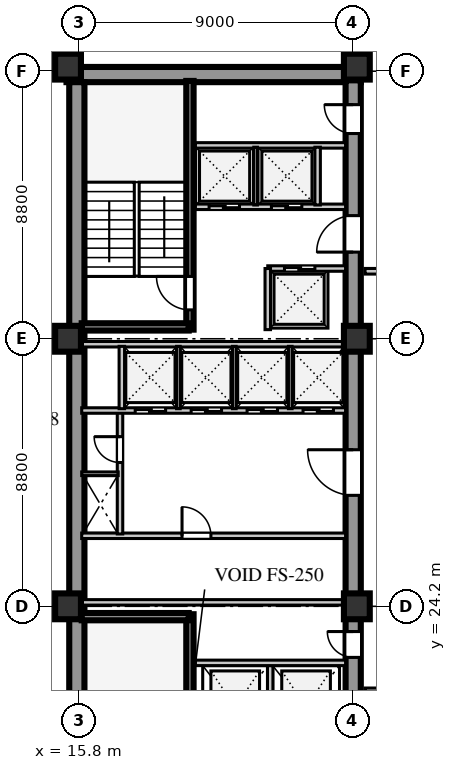
"""IFC4 building model, lengths in metres.
Left out: names, types, materials, properties, quantities, classifications, styles, units other than length and angle.
Written with IfcOpenShell. Run it as: python <this file> out.ifc"""

import sys

from ifc_helpers import new_model, si_unit, direction, frame, frame_2d, origin, origin_2d, place, context, subcontext, project, spatial, rectangle, extrude, element, fill, save


model = new_model("IFC4")
c1 = context("Model", 3, precision=1e-05, world=origin(), true_north=direction((0.0, 1.0)))
c2 = subcontext(c1, "Body", "Model", "MODEL_VIEW")
j1 = project(units=[si_unit("LENGTHUNIT", "METRE"), si_unit("PLANEANGLEUNIT", "RADIAN")], contexts=[c1])
p1 = place(None, origin())
s1 = spatial("IfcSite", under=j1, at=p1, CompositionType="ELEMENT")
p2 = place(p1, origin())
s2 = spatial("IfcBuilding", under=s1, at=p2, CompositionType="ELEMENT")
p3 = place(p2, frame((0.0, 0.0, 150.2)))
s3 = spatial("IfcBuildingStorey", under=s2, at=p3, CompositionType="ELEMENT", Elevation=150.2)
p4 = place(p3, frame((15.4, 41.69, 0.0), z_axis=(0.0, 0.0, 1.0), x_axis=(1.0, 0.0, 0.0)))
e1 = element("IfcWall", 1, at=p4, inside=s3, PredefinedType="SHEAR", context=c2, shape_type="SweptSolid", body=[
    extrude(rectangle(XDim=9.68, YDim=0.5, at=frame_2d((4.84, 0.0))), origin(), (0.0, 0.0, 1.0), 3.55),
])
p5 = place(p3, frame((15.74, 15.81, 0.0), z_axis=(0.0, 0.0, 1.0), x_axis=(0.0, 1.0, 0.0)))
e2 = element("IfcWall", 2, at=p5, inside=s3, PredefinedType="SHEAR", context=c2, shape_type="SweptSolid", body=[
    extrude(rectangle(XDim=25.63, YDim=0.5, at=frame_2d((12.815, 0.0))), origin(), (0.0, 0.0, 1.0), 3.55),
])
p6 = place(p3, frame((24.83, 15.74, 0.0), z_axis=(0.0, 0.0, 1.0), x_axis=(0.0, 1.0, 0.0)))
e3 = element("IfcWall", 3, at=p6, inside=s3, PredefinedType="SHEAR", context=c2, shape_type="SweptSolid", body=[
    extrude(rectangle(XDim=25.76, YDim=0.5, at=frame_2d((12.88, 0.0))), origin(), (0.0, 0.0, 1.0), 3.55),
])
p7 = place(p6, frame((1.61, 0.0, 0.0)))
e4 = element("IfcOpeningElement", 4, at=p7, cuts=e3, PredefinedType="OPENING", context=c2, shape_type="SweptSolid", body=[
    extrude(rectangle(XDim=1.2, YDim=2.1, at=frame_2d((0.6, 1.05))), frame((0.0, 0.26, 0.0), z_axis=(0.0, -1.0, 0.0), x_axis=(1.0, 0.0, 0.0)), (0.0, 0.0, 1.0), 0.52),
])
p8 = place(p6, frame((6.78, 0.0, 0.0)))
e5 = element("IfcOpeningElement", 5, at=p8, cuts=e3, PredefinedType="OPENING", context=c2, shape_type="SweptSolid", body=[
    extrude(rectangle(XDim=0.85, YDim=2.06, at=frame_2d((0.425, 1.03))), frame((0.0, 0.26, 0.0), z_axis=(0.0, -1.0, 0.0), x_axis=(1.0, 0.0, 0.0)), (0.0, 0.0, 1.0), 0.52),
])
p9 = place(p6, frame((12.11, 0.0, 0.0)))
e6 = element("IfcOpeningElement", 6, at=p9, cuts=e3, PredefinedType="OPENING", context=c2, shape_type="SweptSolid", body=[
    extrude(rectangle(XDim=1.5, YDim=2.12, at=frame_2d((0.75, 1.06))), frame((0.0, 0.26, 0.0), z_axis=(0.0, -1.0, 0.0), x_axis=(1.0, 0.0, 0.0)), (0.0, 0.0, 1.0), 0.52),
])
p10 = place(p6, frame((20.11, 0.0, 0.0)))
e7 = element("IfcOpeningElement", 7, at=p10, cuts=e3, PredefinedType="OPENING", context=c2, shape_type="SweptSolid", body=[
    extrude(rectangle(XDim=1.2, YDim=2.12, at=frame_2d((0.6, 1.06))), frame((0.0, 0.26, 0.0), z_axis=(0.0, -1.0, 0.0), x_axis=(1.0, 0.0, 0.0)), (0.0, 0.0, 1.0), 0.52),
])
p11 = place(p6, frame((24.01, 0.0, 0.0)))
e8 = element("IfcOpeningElement", 8, at=p11, cuts=e3, PredefinedType="OPENING", context=c2, shape_type="SweptSolid", body=[
    extrude(rectangle(XDim=0.95, YDim=2.1, at=frame_2d((0.475, 1.05))), frame((0.0, 0.26, 0.0), z_axis=(0.0, -1.0, 0.0), x_axis=(1.0, 0.0, 0.0)), (0.0, 0.0, 1.0), 0.52),
])
for number, where, z_axis, x_axis in (
    (9, (15.45, 24.2, 0.0), (0.0, 0.0, 1.0), (1.0, 0.0, 0.0)),
    (10, (15.45, 33.0, 0.0), (0.0, 0.0, 1.0), (1.0, 0.0, 0.0)),
    (11, (15.45, 41.95, 0.0), (0.0, 0.0, 1.0), (1.0, 0.0, 0.0)),
    (12, (24.95, 24.2, 0.0), (0.0, 0.0, 1.0), (1.0, 0.0, 0.0)),
    (13, (24.95, 33.0, 0.0), (0.0, 0.0, 1.0), (1.0, 0.0, 0.0)),
    (14, (24.95, 41.95, 0.0), (0.0, 0.0, 1.0), (1.0, 0.0, 0.0)),
):
    element("IfcColumn", number, at=place(p3, frame(where, z_axis=z_axis, x_axis=x_axis)), inside=s3, PredefinedType="COLUMN", context=c2, shape_type="SweptSolid", body=[
        extrude(rectangle(XDim=0.85, YDim=0.85, at=origin_2d()), origin(), (0.0, 0.0, 1.0), 3.55),
    ])
p12 = place(p3, frame((19.46, 15.74, 0.0), z_axis=(0.0, 0.0, 1.0), x_axis=(0.0, 1.0, 0.0)))
e15 = element("IfcWall", 15, at=p12, inside=s3, PredefinedType="SHEAR", context=c2, shape_type="SweptSolid", body=[
    extrude(rectangle(XDim=8.2, YDim=0.24, at=frame_2d((4.1, 0.0))), origin(), (0.0, 0.0, 1.0), 3.85),
])
p13 = place(p12, frame((0.45, 0.0, 0.0)))
e16 = element("IfcOpeningElement", 16, at=p13, cuts=e15, PredefinedType="OPENING", context=c2, shape_type="SweptSolid", body=[
    extrude(rectangle(XDim=1.1, YDim=2.1, at=frame_2d((0.55, 1.05))), frame((0.0, 0.13, 0.0), z_axis=(0.0, -1.0, 0.0), x_axis=(1.0, 0.0, 0.0)), (0.0, 0.0, 1.0), 0.26),
])
p14 = place(p3, frame((15.9, 23.86, 0.0), z_axis=(0.0, 0.0, 1.0), x_axis=(1.0, 0.0, 0.0)))
e17 = element("IfcWall", 17, at=p14, inside=s3, PredefinedType="SHEAR", context=c2, shape_type="SweptSolid", body=[
    extrude(rectangle(XDim=3.52, YDim=0.24, at=frame_2d((1.76, 0.0))), origin(), (0.0, 0.0, 1.0), 3.85),
])
p15 = place(p3, frame((22.1, 19.51, 0.0), z_axis=(0.0, 0.0, 1.0), x_axis=(0.0, 1.0, 0.0)))
e18 = element("IfcWall", 18, at=p15, inside=s3, PredefinedType="SOLIDWALL", context=c2, shape_type="SweptSolid", body=[
    extrude(rectangle(XDim=2.74, YDim=0.18, at=frame_2d((1.37, 0.0))), origin(), (0.0, 0.0, 1.0), 3.55),
])
p16 = place(p3, frame((19.64, 22.34, 0.0), z_axis=(0.0, 0.0, 1.0), x_axis=(1.0, 0.0, 0.0)))
e19 = element("IfcWall", 19, at=p16, inside=s3, PredefinedType="SOLIDWALL", context=c2, shape_type="SweptSolid", body=[
    extrude(rectangle(XDim=4.94, YDim=0.18, at=frame_2d((2.47, 0.0))), origin(), (0.0, 0.0, 1.0), 3.55),
])
p17 = place(p3, frame((15.9, 26.52, 0.0), z_axis=(0.0, 0.0, 1.0), x_axis=(1.0, 0.0, 0.0)))
e20 = element("IfcWall", 20, at=p17, inside=s3, PredefinedType="SOLIDWALL", context=c2, shape_type="SweptSolid", body=[
    extrude(rectangle(XDim=8.68, YDim=0.18, at=frame_2d((4.34, 0.0))), origin(), (0.0, 0.0, 1.0), 3.55),
])
p18 = place(p17, frame((3.3, 0.0, 0.0)))
e21 = element("IfcOpeningElement", 21, at=p18, cuts=e20, PredefinedType="OPENING", context=c2, shape_type="SweptSolid", body=[
    extrude(rectangle(XDim=0.95, YDim=2.1, at=frame_2d((0.475, 1.05))), frame((0.0, 0.1, 0.0), z_axis=(0.0, -1.0, 0.0), x_axis=(1.0, 0.0, 0.0)), (0.0, 0.0, 1.0), 0.2),
])
p19 = place(p3, frame((15.9, 24.33, 0.0), z_axis=(0.0, 0.0, 1.0), x_axis=(1.0, 0.0, 0.0)))
e22 = element("IfcWall", 22, at=p19, inside=s3, PredefinedType="SOLIDWALL", context=c2, shape_type="SweptSolid", body=[
    extrude(rectangle(XDim=8.68, YDim=0.18, at=frame_2d((4.34, 0.0))), origin(), (0.0, 0.0, 1.0), 2.9),
])
p20 = place(p3, frame((17.16, 26.58, 0.0), z_axis=(0.0, 0.0, 1.0), x_axis=(0.0, 1.0, 0.0)))
e23 = element("IfcWall", 23, at=p20, inside=s3, PredefinedType="SOLIDWALL", context=c2, shape_type="SweptSolid", body=[
    extrude(rectangle(XDim=4.02, YDim=0.18, at=frame_2d((2.01, 0.0))), origin(), (0.0, 0.0, 1.0), 3.55),
])
p21 = place(p20, frame((2.35, 0.0, 0.0)))
e24 = element("IfcOpeningElement", 24, at=p21, cuts=e23, PredefinedType="OPENING", context=c2, shape_type="SweptSolid", body=[
    extrude(rectangle(XDim=0.85, YDim=2.06, at=frame_2d((0.425, 1.03))), frame((0.0, 0.1, 0.0), z_axis=(0.0, -1.0, 0.0), x_axis=(1.0, 0.0, 0.0)), (0.0, 0.0, 1.0), 0.2),
])
p22 = place(p3, frame((15.9, 28.56, 0.0), z_axis=(0.0, 0.0, 1.0), x_axis=(1.0, 0.0, 0.0)))
e25 = element("IfcWall", 25, at=p22, inside=s3, PredefinedType="PARTITIONING", context=c2, shape_type="SweptSolid", body=[
    extrude(rectangle(XDim=1.2, YDim=0.12, at=frame_2d((0.6, 0.0))), origin(), (0.0, 0.0, 1.0), 3.55),
])
p23 = place(p3, frame((15.9, 30.64, 0.0), z_axis=(0.0, 0.0, 1.0), x_axis=(1.0, 0.0, 0.0)))
e26 = element("IfcWall", 26, at=p23, inside=s3, PredefinedType="SOLIDWALL", context=c2, shape_type="SweptSolid", body=[
    extrude(rectangle(XDim=8.68, YDim=0.18, at=frame_2d((4.34, 0.0))), origin(), (0.0, 0.0, 1.0), 3.55),
])
p24 = place(p23, frame((1.76, 0.0, 0.0)))
e27 = element("IfcOpeningElement", 27, at=p24, cuts=e26, PredefinedType="OPENING", context=c2, shape_type="SweptSolid", body=[
    extrude(rectangle(XDim=1.0, YDim=2.1, at=frame_2d((0.5, 1.05))), frame((0.0, 0.1, 0.0), z_axis=(0.0, -1.0, 0.0), x_axis=(1.0, 0.0, 0.0)), (0.0, 0.0, 1.0), 0.2),
])
p25 = place(p23, frame((3.6, 0.0, 0.0)))
e28 = element("IfcOpeningElement", 28, at=p25, cuts=e26, PredefinedType="OPENING", context=c2, shape_type="SweptSolid", body=[
    extrude(rectangle(XDim=1.0, YDim=2.1, at=frame_2d((0.5, 1.05))), frame((0.0, 0.1, 0.0), z_axis=(0.0, -1.0, 0.0), x_axis=(1.0, 0.0, 0.0)), (0.0, 0.0, 1.0), 0.2),
])
p26 = place(p23, frame((5.44, 0.0, 0.0)))
e29 = element("IfcOpeningElement", 29, at=p26, cuts=e26, PredefinedType="OPENING", context=c2, shape_type="SweptSolid", body=[
    extrude(rectangle(XDim=1.0, YDim=2.1, at=frame_2d((0.5, 1.05))), frame((0.0, 0.1, 0.0), z_axis=(0.0, -1.0, 0.0), x_axis=(1.0, 0.0, 0.0)), (0.0, 0.0, 1.0), 0.2),
])
p27 = place(p23, frame((7.28, 0.0, 0.0)))
e30 = element("IfcOpeningElement", 30, at=p27, cuts=e26, PredefinedType="OPENING", context=c2, shape_type="SweptSolid", body=[
    extrude(rectangle(XDim=1.0, YDim=2.1, at=frame_2d((0.5, 1.05))), frame((0.0, 0.1, 0.0), z_axis=(0.0, -1.0, 0.0), x_axis=(1.0, 0.0, 0.0)), (0.0, 0.0, 1.0), 0.2),
])
p28 = place(p3, frame((15.9, 32.82, 0.0), z_axis=(0.0, 0.0, 1.0), x_axis=(1.0, 0.0, 0.0)))
e31 = element("IfcWall", 31, at=p28, inside=s3, PredefinedType="SOLIDWALL", context=c2, shape_type="SweptSolid", body=[
    extrude(rectangle(XDim=8.68, YDim=0.18, at=frame_2d((4.34, 0.0))), origin(), (0.0, 0.0, 1.0), 2.9),
])
p29 = place(p3, frame((17.22, 30.7, 0.0), z_axis=(0.0, 0.0, 1.0), x_axis=(0.0, 1.0, 0.0)))
e32 = element("IfcWall", 32, at=p29, inside=s3, PredefinedType="SOLIDWALL", context=c2, shape_type="SweptSolid", body=[
    extrude(rectangle(XDim=2.05, YDim=0.18, at=frame_2d((1.025, 0.0))), origin(), (0.0, 0.0, 1.0), 3.55),
])
for number, where, z_axis, x_axis in (
    (33, (19.08, 30.7, 0.0), (0.0, 0.0, 1.0), (0.0, 1.0, 0.0)),
    (34, (20.92, 30.7, 0.0), (0.0, 0.0, 1.0), (0.0, 1.0, 0.0)),
    (35, (22.76, 30.7, 0.0), (0.0, 0.0, 1.0), (0.0, 1.0, 0.0)),
):
    element("IfcWall", number, at=place(p3, frame(where, z_axis=z_axis, x_axis=x_axis)), inside=s3, PredefinedType="PARTITIONING", context=c2, shape_type="SweptSolid", body=[
        extrude(rectangle(XDim=2.05, YDim=0.12, at=frame_2d((1.025, 0.0))), origin(), (0.0, 0.0, 1.0), 3.55),
    ])
p30 = place(p3, frame((19.46, 33.3, 0.0), z_axis=(0.0, 0.0, 1.0), x_axis=(0.0, 1.0, 0.0)))
e36 = element("IfcWall", 36, at=p30, inside=s3, PredefinedType="SHEAR", context=c2, shape_type="SweptSolid", body=[
    extrude(rectangle(XDim=8.18, YDim=0.24, at=frame_2d((4.09, 0.0))), origin(), (0.0, 0.0, 1.0), 3.85),
])
p31 = place(p30, frame((0.65, 0.0, 0.0)))
e37 = element("IfcOpeningElement", 37, at=p31, cuts=e36, PredefinedType="OPENING", context=c2, shape_type="SweptSolid", body=[
    extrude(rectangle(XDim=1.1, YDim=2.1, at=frame_2d((0.55, 1.05))), frame((0.0, 0.13, 0.0), z_axis=(0.0, -1.0, 0.0), x_axis=(1.0, 0.0, 0.0)), (0.0, 0.0, 1.0), 0.26),
])
p32 = place(p3, frame((15.9, 33.39, 0.0), z_axis=(0.0, 0.0, 1.0), x_axis=(1.0, 0.0, 0.0)))
e38 = element("IfcWall", 38, at=p32, inside=s3, PredefinedType="SHEAR", context=c2, shape_type="SweptSolid", body=[
    extrude(rectangle(XDim=3.52, YDim=0.24, at=frame_2d((1.76, 0.0))), origin(), (0.0, 0.0, 1.0), 3.85),
])
p33 = place(p3, frame((22.02, 35.31, 0.0), z_axis=(0.0, 0.0, 1.0), x_axis=(1.0, 0.0, 0.0)))
e39 = element("IfcWall", 39, at=p33, inside=s3, PredefinedType="SOLIDWALL", context=c2, shape_type="SweptSolid", body=[
    extrude(rectangle(XDim=2.56, YDim=0.18, at=frame_2d((1.28, 0.0))), origin(), (0.0, 0.0, 1.0), 3.55),
])
p34 = place(p33, frame((0.55, 0.0, 0.0)))
e40 = element("IfcOpeningElement", 40, at=p34, cuts=e39, PredefinedType="OPENING", context=c2, shape_type="SweptSolid", body=[
    extrude(rectangle(XDim=1.0, YDim=2.1, at=frame_2d((0.5, 1.05))), frame((0.0, 0.1, 0.0), z_axis=(0.0, -1.0, 0.0), x_axis=(1.0, 0.0, 0.0)), (0.0, 0.0, 1.0), 0.2),
])
p35 = place(p3, frame((22.02, 33.3, 0.0), z_axis=(0.0, 0.0, 1.0), x_axis=(0.0, 1.0, 0.0)))
e41 = element("IfcWall", 41, at=p35, inside=s3, PredefinedType="SOLIDWALL", context=c2, shape_type="SweptSolid", body=[
    extrude(rectangle(XDim=2.01, YDim=0.18, at=frame_2d((1.005, 0.0))), origin(), (0.0, 0.0, 1.0), 3.55),
])
p36 = place(p3, frame((19.64, 37.34, 0.0), z_axis=(0.0, 0.0, 1.0), x_axis=(1.0, 0.0, 0.0)))
e42 = element("IfcWall", 42, at=p36, inside=s3, PredefinedType="SOLIDWALL", context=c2, shape_type="SweptSolid", body=[
    extrude(rectangle(XDim=4.94, YDim=0.18, at=frame_2d((2.47, 0.0))), origin(), (0.0, 0.0, 1.0), 3.55),
])
p37 = place(p36, frame((0.45, 0.0, 0.0)))
e43 = element("IfcOpeningElement", 43, at=p37, cuts=e42, PredefinedType="OPENING", context=c2, shape_type="SweptSolid", body=[
    extrude(rectangle(XDim=1.0, YDim=2.1, at=frame_2d((0.5, 1.05))), frame((0.0, 0.1, 0.0), z_axis=(0.0, -1.0, 0.0), x_axis=(1.0, 0.0, 0.0)), (0.0, 0.0, 1.0), 0.2),
])
p38 = place(p36, frame((2.5, 0.0, 0.0)))
e44 = element("IfcOpeningElement", 44, at=p38, cuts=e42, PredefinedType="OPENING", context=c2, shape_type="SweptSolid", body=[
    extrude(rectangle(XDim=1.0, YDim=2.1, at=frame_2d((0.5, 1.05))), frame((0.0, 0.1, 0.0), z_axis=(0.0, -1.0, 0.0), x_axis=(1.0, 0.0, 0.0)), (0.0, 0.0, 1.0), 0.2),
])
p39 = place(p3, frame((19.64, 39.36, 0.0), z_axis=(0.0, 0.0, 1.0), x_axis=(1.0, 0.0, 0.0)))
e45 = element("IfcWall", 45, at=p39, inside=s3, PredefinedType="SOLIDWALL", context=c2, shape_type="SweptSolid", body=[
    extrude(rectangle(XDim=4.94, YDim=0.18, at=frame_2d((2.47, 0.0))), origin(), (0.0, 0.0, 1.0), 3.55),
])
p40 = place(p3, frame((21.62, 37.4, 0.0), z_axis=(0.0, 0.0, 1.0), x_axis=(0.0, 1.0, 0.0)))
e46 = element("IfcWall", 46, at=p40, inside=s3, PredefinedType="PARTITIONING", context=c2, shape_type="SweptSolid", body=[
    extrude(rectangle(XDim=1.9, YDim=0.12, at=frame_2d((0.95, 0.0))), origin(), (0.0, 0.0, 1.0), 3.55),
])
p41 = place(p3, frame((23.66, 37.4, 0.0), z_axis=(0.0, 0.0, 1.0), x_axis=(0.0, 1.0, 0.0)))
e47 = element("IfcWall", 47, at=p41, inside=s3, PredefinedType="SOLIDWALL", context=c2, shape_type="SweptSolid", body=[
    extrude(rectangle(XDim=1.9, YDim=0.18, at=frame_2d((0.95, 0.0))), origin(), (0.0, 0.0, 1.0), 3.55),
])
p42 = place(p3, frame((25.22, 21.42, 0.0), z_axis=(0.0, 0.0, 1.0), x_axis=(1.0, 0.0, 0.0)))
e48 = element("IfcWall", 48, at=p42, inside=s3, PredefinedType="SOLIDWALL", context=c2, shape_type="SweptSolid", body=[
    extrude(rectangle(XDim=15.6, YDim=0.185, at=frame_2d((7.8, 0.0))), origin(), (0.0, 0.0, 1.0), 3.15),
])
p43 = place(p42, frame((0.73, 0.0, 0.0)))
e49 = element("IfcOpeningElement", 49, at=p43, cuts=e48, PredefinedType="OPENING", context=c2, shape_type="SweptSolid", body=[
    extrude(rectangle(XDim=0.95, YDim=2.1, at=frame_2d((0.475, 1.05))), frame((0.0, 0.103, 0.0), z_axis=(0.0, -1.0, 0.0), x_axis=(1.0, 0.0, 0.0)), (0.0, 0.0, 1.0), 0.205),
])
p44 = place(p3, frame((25.22, 35.22, 0.0), z_axis=(0.0, 0.0, 1.0), x_axis=(1.0, 0.0, 0.0)))
e50 = element("IfcWall", 50, at=p44, inside=s3, PredefinedType="SOLIDWALL", context=c2, shape_type="SweptSolid", body=[
    extrude(rectangle(XDim=9.5, YDim=0.185, at=frame_2d((4.75, 0.0))), origin(), (0.0, 0.0, 1.0), 3.55),
])
p45 = place(p44, frame((1.2, 0.0, 0.0)))
e51 = element("IfcOpeningElement", 51, at=p45, cuts=e50, PredefinedType="OPENING", context=c2, shape_type="SweptSolid", body=[
    extrude(rectangle(XDim=0.95, YDim=2.1, at=frame_2d((0.475, 1.05))), frame((0.0, 0.103, 0.0), z_axis=(0.0, -1.0, 0.0), x_axis=(1.0, 0.0, 0.0)), (0.0, 0.0, 1.0), 0.205),
])
p46 = place(p8, frame((0.85, 0.0, 0.0), z_axis=(0.0, 0.0, 1.0), x_axis=(-1.0, 0.0, 0.0)))
e52 = element("IfcDoor", 52, at=p46, inside=s3, OperationType="SINGLE_SWING_LEFT", PredefinedType="DOOR", context=c2, shape_type="SweptSolid", body=[
    extrude(rectangle(XDim=0.85, YDim=2.06, at=frame_2d((0.425, 1.03))), frame((0.0, 0.025, 0.0), z_axis=(0.0, -1.0, 0.0), x_axis=(1.0, 0.0, 0.0)), (0.0, 0.0, 1.0), 0.05),
])
fill(e5, e52)
p47 = place(p18, origin())
e53 = element("IfcDoor", 53, at=p47, inside=s3, OperationType="SINGLE_SWING_LEFT", PredefinedType="DOOR", context=c2, shape_type="SweptSolid", body=[
    extrude(rectangle(XDim=0.95, YDim=2.1, at=frame_2d((0.475, 1.05))), frame((0.0, 0.025, 0.0), z_axis=(0.0, -1.0, 0.0), x_axis=(1.0, 0.0, 0.0)), (0.0, 0.0, 1.0), 0.05),
])
fill(e21, e53)
p48 = place(p21, origin())
e54 = element("IfcDoor", 54, at=p48, inside=s3, OperationType="SINGLE_SWING_RIGHT", PredefinedType="DOOR", context=c2, shape_type="SweptSolid", body=[
    extrude(rectangle(XDim=0.85, YDim=2.06, at=frame_2d((0.425, 1.03))), frame((0.0, 0.025, 0.0), z_axis=(0.0, -1.0, 0.0), x_axis=(1.0, 0.0, 0.0)), (0.0, 0.0, 1.0), 0.05),
])
fill(e24, e54)
p49 = place(p9, frame((1.5, 0.0, 0.0), z_axis=(0.0, 0.0, 1.0), x_axis=(-1.0, 0.0, 0.0)))
e55 = element("IfcDoor", 55, at=p49, inside=s3, OperationType="SINGLE_SWING_LEFT", PredefinedType="DOOR", context=c2, shape_type="SweptSolid", body=[
    extrude(rectangle(XDim=1.5, YDim=2.12, at=frame_2d((0.75, 1.06))), frame((0.0, 0.025, 0.0), z_axis=(0.0, -1.0, 0.0), x_axis=(1.0, 0.0, 0.0)), (0.0, 0.0, 1.0), 0.05),
])
fill(e6, e55)
p50 = place(p24, frame((1.0, 0.0, 0.0), z_axis=(0.0, 0.0, 1.0), x_axis=(-1.0, 0.0, 0.0)))
e56 = element("IfcDoor", 56, at=p50, inside=s3, OperationType="DOUBLE_DOOR_SLIDING", PredefinedType="DOOR", context=c2, shape_type="SweptSolid", body=[
    extrude(rectangle(XDim=1.0, YDim=2.1, at=frame_2d((0.5, 1.05))), frame((0.0, 0.025, 0.0), z_axis=(0.0, -1.0, 0.0), x_axis=(1.0, 0.0, 0.0)), (0.0, 0.0, 1.0), 0.05),
])
fill(e27, e56)
p51 = place(p25, frame((1.0, 0.0, 0.0), z_axis=(0.0, 0.0, 1.0), x_axis=(-1.0, 0.0, 0.0)))
e57 = element("IfcDoor", 57, at=p51, inside=s3, OperationType="DOUBLE_DOOR_SLIDING", PredefinedType="DOOR", context=c2, shape_type="SweptSolid", body=[
    extrude(rectangle(XDim=1.0, YDim=2.1, at=frame_2d((0.5, 1.05))), frame((0.0, 0.025, 0.0), z_axis=(0.0, -1.0, 0.0), x_axis=(1.0, 0.0, 0.0)), (0.0, 0.0, 1.0), 0.05),
])
fill(e28, e57)
p52 = place(p26, frame((1.0, 0.0, 0.0), z_axis=(0.0, 0.0, 1.0), x_axis=(-1.0, 0.0, 0.0)))
e58 = element("IfcDoor", 58, at=p52, inside=s3, OperationType="DOUBLE_DOOR_SLIDING", PredefinedType="DOOR", context=c2, shape_type="SweptSolid", body=[
    extrude(rectangle(XDim=1.0, YDim=2.1, at=frame_2d((0.5, 1.05))), frame((0.0, 0.025, 0.0), z_axis=(0.0, -1.0, 0.0), x_axis=(1.0, 0.0, 0.0)), (0.0, 0.0, 1.0), 0.05),
])
fill(e29, e58)
p53 = place(p27, frame((1.0, 0.0, 0.0), z_axis=(0.0, 0.0, 1.0), x_axis=(-1.0, 0.0, 0.0)))
e59 = element("IfcDoor", 59, at=p53, inside=s3, OperationType="DOUBLE_DOOR_SLIDING", PredefinedType="DOOR", context=c2, shape_type="SweptSolid", body=[
    extrude(rectangle(XDim=1.0, YDim=2.1, at=frame_2d((0.5, 1.05))), frame((0.0, 0.025, 0.0), z_axis=(0.0, -1.0, 0.0), x_axis=(1.0, 0.0, 0.0)), (0.0, 0.0, 1.0), 0.05),
])
fill(e30, e59)
p54 = place(p31, origin())
e60 = element("IfcDoor", 60, at=p54, inside=s3, OperationType="SINGLE_SWING_RIGHT", PredefinedType="DOOR", context=c2, shape_type="SweptSolid", body=[
    extrude(rectangle(XDim=1.1, YDim=2.1, at=frame_2d((0.55, 1.05))), frame((0.0, 0.025, 0.0), z_axis=(0.0, -1.0, 0.0), x_axis=(1.0, 0.0, 0.0)), (0.0, 0.0, 1.0), 0.05),
])
fill(e37, e60)
p55 = place(p10, frame((1.2, 0.0, 0.0), z_axis=(0.0, 0.0, 1.0), x_axis=(-1.0, 0.0, 0.0)))
e61 = element("IfcDoor", 61, at=p55, inside=s3, OperationType="SINGLE_SWING_RIGHT", PredefinedType="DOOR", context=c2, shape_type="SweptSolid", body=[
    extrude(rectangle(XDim=1.2, YDim=2.12, at=frame_2d((0.6, 1.06))), frame((0.0, 0.025, 0.0), z_axis=(0.0, -1.0, 0.0), x_axis=(1.0, 0.0, 0.0)), (0.0, 0.0, 1.0), 0.05),
])
fill(e7, e61)
p56 = place(p37, frame((1.0, 0.0, 0.0), z_axis=(0.0, 0.0, 1.0), x_axis=(-1.0, 0.0, 0.0)))
e62 = element("IfcDoor", 62, at=p56, inside=s3, OperationType="DOUBLE_DOOR_SLIDING", PredefinedType="DOOR", context=c2, shape_type="SweptSolid", body=[
    extrude(rectangle(XDim=1.0, YDim=2.1, at=frame_2d((0.5, 1.05))), frame((0.0, 0.025, 0.0), z_axis=(0.0, -1.0, 0.0), x_axis=(1.0, 0.0, 0.0)), (0.0, 0.0, 1.0), 0.05),
])
fill(e43, e62)
p57 = place(p38, frame((1.0, 0.0, 0.0), z_axis=(0.0, 0.0, 1.0), x_axis=(-1.0, 0.0, 0.0)))
e63 = element("IfcDoor", 63, at=p57, inside=s3, OperationType="DOUBLE_DOOR_SLIDING", PredefinedType="DOOR", context=c2, shape_type="SweptSolid", body=[
    extrude(rectangle(XDim=1.0, YDim=2.1, at=frame_2d((0.5, 1.05))), frame((0.0, 0.025, 0.0), z_axis=(0.0, -1.0, 0.0), x_axis=(1.0, 0.0, 0.0)), (0.0, 0.0, 1.0), 0.05),
])
fill(e44, e63)
p58 = place(p34, origin())
e64 = element("IfcDoor", 64, at=p58, inside=s3, OperationType="DOUBLE_DOOR_SLIDING", PredefinedType="DOOR", context=c2, shape_type="SweptSolid", body=[
    extrude(rectangle(XDim=1.0, YDim=2.1, at=frame_2d((0.5, 1.05))), frame((0.0, 0.025, 0.0), z_axis=(0.0, -1.0, 0.0), x_axis=(1.0, 0.0, 0.0)), (0.0, 0.0, 1.0), 0.05),
])
fill(e40, e64)
p59 = place(p11, frame((0.95, 0.0, 0.0), z_axis=(0.0, 0.0, 1.0), x_axis=(-1.0, 0.0, 0.0)))
e65 = element("IfcDoor", 65, at=p59, inside=s3, OperationType="SINGLE_SWING_LEFT", PredefinedType="DOOR", context=c2, shape_type="SweptSolid", body=[
    extrude(rectangle(XDim=0.95, YDim=2.1, at=frame_2d((0.475, 1.05))), frame((0.0, 0.025, 0.0), z_axis=(0.0, -1.0, 0.0), x_axis=(1.0, 0.0, 0.0)), (0.0, 0.0, 1.0), 0.05),
])
fill(e8, e65)
save(model, sys.argv[1])
